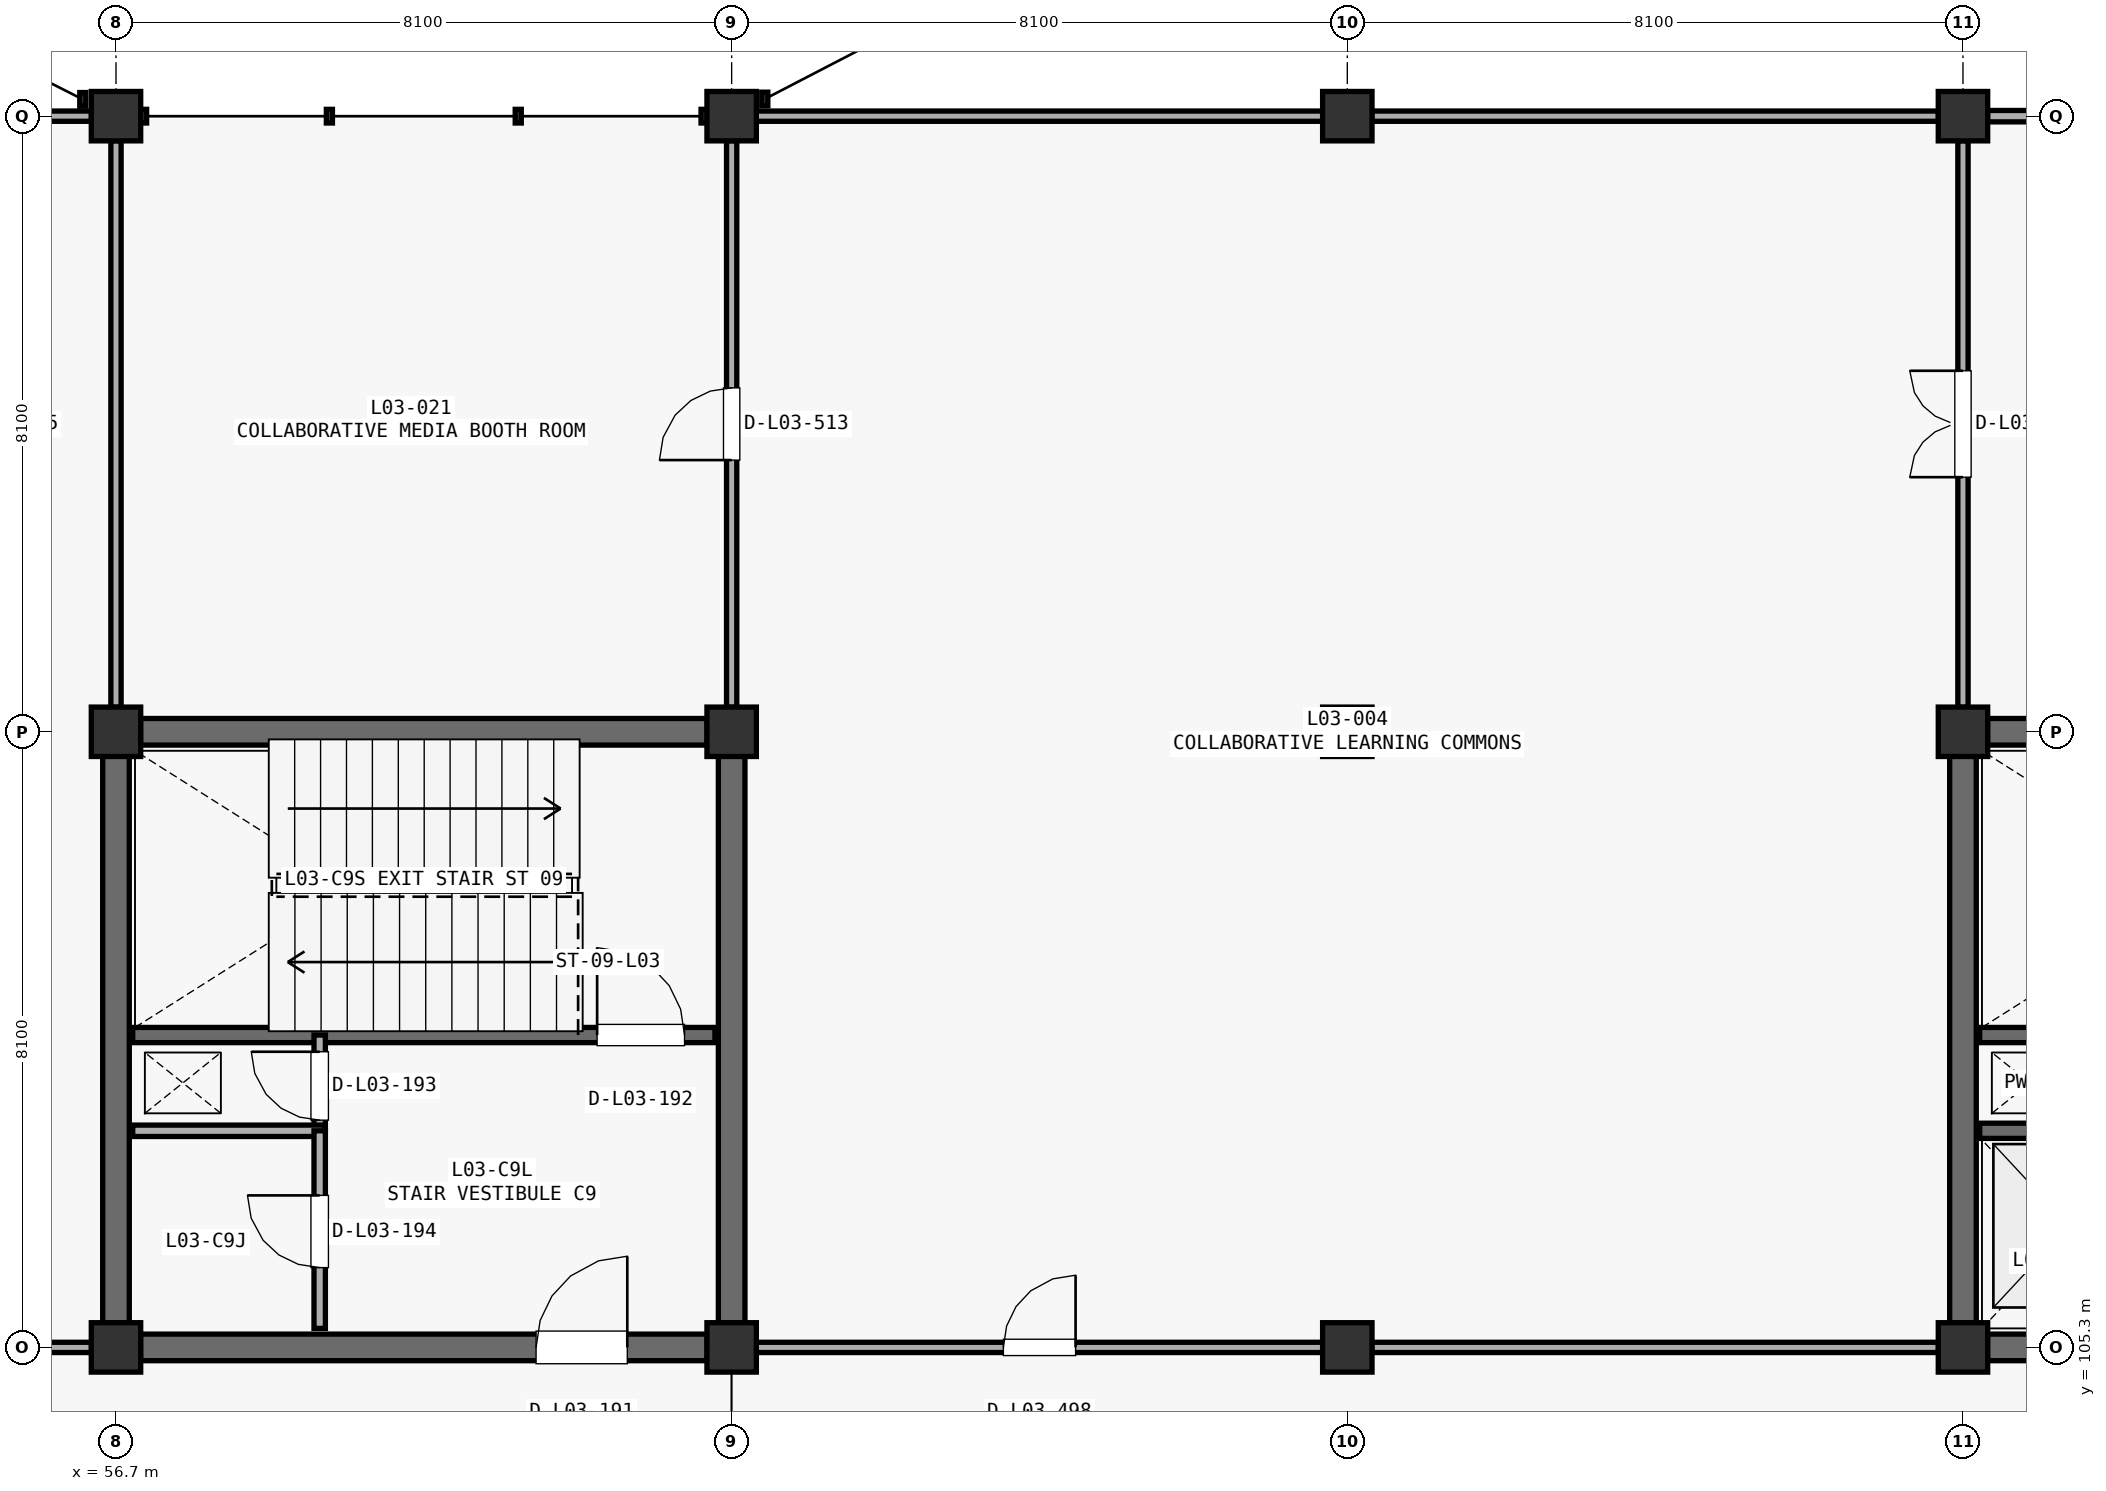
"""IFC4 building model, lengths in metres.
Left out: names, types, materials, properties, quantities, classifications, styles, units other than length and angle.
Written with IfcOpenShell. Run it as: python <this file> out.ifc"""

import sys

from ifc_helpers import new_model, si_unit, direction, frame, frame_2d, origin, origin_2d, place, context, subcontext, project, spatial, rectangle, extrude, element, fill, save


model = new_model("IFC4")
c1 = context("Model", 3, precision=1e-05, world=origin(), true_north=direction((0.0, 1.0)))
c2 = subcontext(c1, "Body", "Model", "MODEL_VIEW")
j1 = project(units=[si_unit("LENGTHUNIT", "METRE"), si_unit("PLANEANGLEUNIT", "RADIAN")], contexts=[c1])
p1 = place(None, origin())
s1 = spatial("IfcSite", under=j1, at=p1, CompositionType="ELEMENT")
p2 = place(p1, origin())
s2 = spatial("IfcBuilding", under=s1, at=p2, CompositionType="ELEMENT")
p3 = place(p2, frame((0.0, 0.0, 14.11)))
s3 = spatial("IfcBuildingStorey", under=s2, at=p3, CompositionType="ELEMENT", Elevation=14.11)
for number, where, z_axis, x_axis in (
    (1, (56.7, 105.3, 0.0), (0.0, 0.0, 1.0), (1.0, 0.0, 0.0)),
    (2, (56.7, 113.4, 0.0), (0.0, 0.0, 1.0), (1.0, 0.0, 0.0)),
    (3, (56.7, 121.5, 0.0), (0.0, 0.0, 1.0), (1.0, 0.0, 0.0)),
    (4, (64.8, 105.3, 0.0), (0.0, 0.0, 1.0), (1.0, 0.0, 0.0)),
    (5, (64.8, 113.4, 0.0), (0.0, 0.0, 1.0), (1.0, 0.0, 0.0)),
    (6, (64.8, 121.5, 0.0), (0.0, 0.0, 1.0), (1.0, 0.0, 0.0)),
    (7, (72.9, 105.3, 0.0), (0.0, 0.0, 1.0), (1.0, 0.0, 0.0)),
    (8, (72.9, 113.4, 0.0), (0.0, 0.0, 1.0), (1.0, 0.0, 0.0)),
    (9, (72.9, 121.5, 0.0), (0.0, 0.0, 1.0), (1.0, 0.0, 0.0)),
    (10, (81.0, 105.3, 0.0), (0.0, 0.0, 1.0), (1.0, 0.0, 0.0)),
    (11, (81.0, 113.4, 0.0), (0.0, 0.0, 1.0), (1.0, 0.0, 0.0)),
    (12, (81.0, 121.5, 0.0), (0.0, 0.0, 1.0), (1.0, 0.0, 0.0)),
):
    element("IfcColumn", number, at=place(p3, frame(where, z_axis=z_axis, x_axis=x_axis)), inside=s3, PredefinedType="COLUMN", context=c2, shape_type="SweptSolid", body=[
        extrude(rectangle(XDim=0.65, YDim=0.65, at=origin_2d()), origin(), (0.0, 0.0, 1.0), 4.42),
    ])
p4 = place(p3, frame((81.323, 113.4, 0.0), z_axis=(0.0, 0.0, 1.0), x_axis=(1.0, 0.0, 0.0)))
e13 = element("IfcWall", 13, at=p4, inside=s3, PredefinedType="SHEAR", context=c2, shape_type="SweptSolid", body=[
    extrude(rectangle(XDim=7.454, YDim=0.35, at=frame_2d((3.727, 0.0))), origin(), (0.0, 0.0, 1.0), 4.152),
])
p5 = place(p3, frame((81.0, 105.623, 0.0), z_axis=(0.0, 0.0, 1.0), x_axis=(0.0, 1.0, 0.0)))
e14 = element("IfcWall", 14, at=p5, inside=s3, PredefinedType="SHEAR", context=c2, shape_type="SweptSolid", body=[
    extrude(rectangle(XDim=7.454, YDim=0.35, at=frame_2d((3.727, 0.0))), origin(), (0.0, 0.0, 1.0), 4.152),
])
p6 = place(p3, frame((81.323, 105.3, 0.0), z_axis=(0.0, 0.0, 1.0), x_axis=(1.0, 0.0, 0.0)))
e15 = element("IfcWall", 15, at=p6, inside=s3, PredefinedType="SHEAR", context=c2, shape_type="SweptSolid", body=[
    extrude(rectangle(XDim=7.454, YDim=0.35, at=frame_2d((3.727, 0.0))), origin(), (0.0, 0.0, 1.0), 4.152),
])
p7 = place(p6, frame((5.204, 0.0, 0.0)))
e16 = element("IfcOpeningElement", 16, at=p7, cuts=e15, PredefinedType="OPENING", context=c2, shape_type="SweptSolid", body=[
    extrude(rectangle(XDim=1.2, YDim=2.2, at=frame_2d((0.6, 1.1))), frame((0.0, 0.185, 0.0), z_axis=(0.0, -1.0, 0.0), x_axis=(1.0, 0.0, 0.0)), (0.0, 0.0, 1.0), 0.37),
])
p8 = place(p3, frame((81.22, 109.41, 0.0), z_axis=(0.0, 0.0, 1.0), x_axis=(1.0, 0.0, 0.0)))
e17 = element("IfcWall", 17, at=p8, inside=s3, PredefinedType="SHEAR", context=c2, shape_type="SweptSolid", body=[
    extrude(rectangle(XDim=7.66, YDim=0.2, at=frame_2d((3.83, 0.0))), origin(), (0.0, 0.0, 1.0), 4.152),
])
p9 = place(p8, frame((6.11, 0.0, 0.0)))
e18 = element("IfcOpeningElement", 18, at=p9, cuts=e17, PredefinedType="OPENING", context=c2, shape_type="SweptSolid", body=[
    extrude(rectangle(XDim=1.15, YDim=2.2, at=frame_2d((0.575, 1.1))), frame((0.0, 0.11, 0.0), z_axis=(0.0, -1.0, 0.0), x_axis=(1.0, 0.0, 0.0)), (0.0, 0.0, 1.0), 0.22),
])
p10 = place(p3, frame((81.22, 108.15, 0.0), z_axis=(0.0, 0.0, 1.0), x_axis=(1.0, 0.0, 0.0)))
e19 = element("IfcWall", 19, at=p10, inside=s3, PredefinedType="SHEAR", context=c2, shape_type="SweptSolid", body=[
    extrude(rectangle(XDim=2.56, YDim=0.2, at=frame_2d((1.28, 0.0))), origin(), (0.0, 0.0, 1.0), 4.152),
])
p11 = place(p3, frame((57.023, 113.4, 0.0), z_axis=(0.0, 0.0, 1.0), x_axis=(1.0, 0.0, 0.0)))
e20 = element("IfcWall", 20, at=p11, inside=s3, PredefinedType="SHEAR", context=c2, shape_type="SweptSolid", body=[
    extrude(rectangle(XDim=7.454, YDim=0.35, at=frame_2d((3.727, 0.0))), origin(), (0.0, 0.0, 1.0), 4.162),
])
for number, where, z_axis, x_axis in (
    (21, (56.7, 105.623, 0.0), (0.0, 0.0, 1.0), (0.0, 1.0, 0.0)),
    (22, (64.8, 105.623, 0.0), (0.0, 0.0, 1.0), (0.0, 1.0, 0.0)),
):
    element("IfcWall", number, at=place(p3, frame(where, z_axis=z_axis, x_axis=x_axis)), inside=s3, PredefinedType="SHEAR", context=c2, shape_type="SweptSolid", body=[
        extrude(rectangle(XDim=7.454, YDim=0.35, at=frame_2d((3.727, 0.0))), origin(), (0.0, 0.0, 1.0), 4.162),
    ])
p12 = place(p3, frame((57.023, 105.3, 0.0), z_axis=(0.0, 0.0, 1.0), x_axis=(1.0, 0.0, 0.0)))
e23 = element("IfcWall", 23, at=p12, inside=s3, PredefinedType="SHEAR", context=c2, shape_type="SweptSolid", body=[
    extrude(rectangle(XDim=7.454, YDim=0.35, at=frame_2d((3.727, 0.0))), origin(), (0.0, 0.0, 1.0), 4.162),
])
p13 = place(p12, frame((5.204, 0.0, 0.0)))
e24 = element("IfcOpeningElement", 24, at=p13, cuts=e23, PredefinedType="OPENING", context=c2, shape_type="SweptSolid", body=[
    extrude(rectangle(XDim=1.2, YDim=2.2, at=frame_2d((0.6, 1.1))), frame((0.0, 0.185, 0.0), z_axis=(0.0, -1.0, 0.0), x_axis=(1.0, 0.0, 0.0)), (0.0, 0.0, 1.0), 0.37),
])
p14 = place(p3, frame((56.92, 109.41, 0.0), z_axis=(0.0, 0.0, 1.0), x_axis=(1.0, 0.0, 0.0)))
e25 = element("IfcWall", 25, at=p14, inside=s3, PredefinedType="SHEAR", context=c2, shape_type="SweptSolid", body=[
    extrude(rectangle(XDim=7.66, YDim=0.2, at=frame_2d((3.83, 0.0))), origin(), (0.0, 0.0, 1.0), 4.162),
])
p15 = place(p14, frame((6.11, 0.0, 0.0)))
e26 = element("IfcOpeningElement", 26, at=p15, cuts=e25, PredefinedType="OPENING", context=c2, shape_type="SweptSolid", body=[
    extrude(rectangle(XDim=1.15, YDim=2.2, at=frame_2d((0.575, 1.1))), frame((0.0, 0.11, 0.0), z_axis=(0.0, -1.0, 0.0), x_axis=(1.0, 0.0, 0.0)), (0.0, 0.0, 1.0), 0.22),
])
p16 = place(p3, frame((59.38, 108.15, 0.0), z_axis=(0.0, 0.0, 1.0), x_axis=(0.0, 1.0, 0.0)))
e27 = element("IfcWall", 27, at=p16, inside=s3, PredefinedType="PARTITIONING", context=c2, shape_type="SweptSolid", body=[
    extrude(rectangle(XDim=1.26, YDim=0.15, at=frame_2d((0.63, 0.0))), origin(), (0.0, 0.0, 1.0), 4.162),
])
p17 = place(p16, frame((0.14, 0.0, 0.0)))
e28 = element("IfcOpeningElement", 28, at=p17, cuts=e27, PredefinedType="OPENING", context=c2, shape_type="SweptSolid", body=[
    extrude(rectangle(XDim=0.9, YDim=2.15, at=frame_2d((0.45, 1.075))), frame((0.0, 0.085, 0.0), z_axis=(0.0, -1.0, 0.0), x_axis=(1.0, 0.0, 0.0)), (0.0, 0.0, 1.0), 0.17),
])
p18 = place(p3, frame((56.92, 108.15, 0.0), z_axis=(0.0, 0.0, 1.0), x_axis=(1.0, 0.0, 0.0)))
e29 = element("IfcWall", 29, at=p18, inside=s3, PredefinedType="PARTITIONING", context=c2, shape_type="SweptSolid", body=[
    extrude(rectangle(XDim=2.53, YDim=0.15, at=frame_2d((1.265, 0.0))), origin(), (0.0, 0.0, 1.0), 4.162),
])
p19 = place(p3, frame((59.38, 105.55, 0.0), z_axis=(0.0, 0.0, 1.0), x_axis=(0.0, 1.0, 0.0)))
e30 = element("IfcWall", 30, at=p19, inside=s3, PredefinedType="PARTITIONING", context=c2, shape_type="SweptSolid", body=[
    extrude(rectangle(XDim=2.6, YDim=0.15, at=frame_2d((1.3, 0.0))), origin(), (0.0, 0.0, 1.0), 4.162),
])
p20 = place(p19, frame((0.8, 0.0, 0.0)))
e31 = element("IfcOpeningElement", 31, at=p20, cuts=e30, PredefinedType="OPENING", context=c2, shape_type="SweptSolid", body=[
    extrude(rectangle(XDim=0.95, YDim=2.15, at=frame_2d((0.475, 1.075))), frame((0.0, 0.085, 0.0), z_axis=(0.0, -1.0, 0.0), x_axis=(1.0, 0.0, 0.0)), (0.0, 0.0, 1.0), 0.17),
])
p21 = place(p3, frame((48.923, 105.3, 0.0), z_axis=(0.0, 0.0, 1.0), x_axis=(1.0, 0.0, 0.0)))
e32 = element("IfcWall", 32, at=p21, inside=s3, PredefinedType="PARTITIONING", context=c2, shape_type="SweptSolid", body=[
    extrude(rectangle(XDim=7.454, YDim=0.135, at=frame_2d((3.727, 0.0))), origin(), (0.0, 0.0, 1.0), 3.312),
])
p22 = place(p21, frame((3.252, 0.0, 0.0)))
e33 = element("IfcOpeningElement", 33, at=p22, cuts=e32, PredefinedType="OPENING", context=c2, shape_type="SweptSolid", body=[
    extrude(rectangle(XDim=0.95, YDim=2.15, at=frame_2d((0.475, 1.075))), frame((0.0, 0.078, 0.0), z_axis=(0.0, -1.0, 0.0), x_axis=(1.0, 0.0, 0.0)), (0.0, 0.0, 1.0), 0.155),
])
p23 = place(p3, frame((56.7, 113.723, 0.0), z_axis=(0.0, 0.0, 1.0), x_axis=(0.0, 1.0, 0.0)))
e34 = element("IfcWall", 34, at=p23, inside=s3, PredefinedType="PARTITIONING", context=c2, shape_type="SweptSolid", body=[
    extrude(rectangle(XDim=7.454, YDim=0.135, at=frame_2d((3.727, 0.0))), origin(), (0.0, 0.0, 1.0), 3.562),
])
p24 = place(p3, frame((48.923, 121.5, 0.0), z_axis=(0.0, 0.0, 1.0), x_axis=(1.0, 0.0, 0.0)))
e35 = element("IfcWall", 35, at=p24, inside=s3, PredefinedType="PARTITIONING", context=c2, shape_type="SweptSolid", body=[
    extrude(rectangle(XDim=7.454, YDim=0.135, at=frame_2d((3.727, 0.0))), origin(), (0.0, 0.0, 1.0), 3.747),
])
p25 = place(p3, frame((65.123, 105.3, 0.0), z_axis=(0.0, 0.0, 1.0), x_axis=(1.0, 0.0, 0.0)))
e36 = element("IfcWall", 36, at=p25, inside=s3, PredefinedType="PARTITIONING", context=c2, shape_type="SweptSolid", body=[
    extrude(rectangle(XDim=7.454, YDim=0.135, at=frame_2d((3.727, 0.0))), origin(), (0.0, 0.0, 1.0), 3.412),
])
p26 = place(p25, frame((3.252, 0.0, 0.0)))
e37 = element("IfcOpeningElement", 37, at=p26, cuts=e36, PredefinedType="OPENING", context=c2, shape_type="SweptSolid", body=[
    extrude(rectangle(XDim=0.95, YDim=2.15, at=frame_2d((0.475, 1.075))), frame((0.0, 0.078, 0.0), z_axis=(0.0, -1.0, 0.0), x_axis=(1.0, 0.0, 0.0)), (0.0, 0.0, 1.0), 0.155),
])
p27 = place(p3, frame((73.223, 105.3, 0.0), z_axis=(0.0, 0.0, 1.0), x_axis=(1.0, 0.0, 0.0)))
e38 = element("IfcWall", 38, at=p27, inside=s3, PredefinedType="PARTITIONING", context=c2, shape_type="SweptSolid", body=[
    extrude(rectangle(XDim=7.454, YDim=0.135, at=frame_2d((3.727, 0.0))), origin(), (0.0, 0.0, 1.0), 3.502),
])
p28 = place(p3, frame((81.0, 113.723, 0.0), z_axis=(0.0, 0.0, 1.0), x_axis=(0.0, 1.0, 0.0)))
e39 = element("IfcWall", 39, at=p28, inside=s3, PredefinedType="PARTITIONING", context=c2, shape_type="SweptSolid", body=[
    extrude(rectangle(XDim=7.454, YDim=0.135, at=frame_2d((3.727, 0.0))), origin(), (0.0, 0.0, 1.0), 3.302),
])
p29 = place(p28, frame((3.027, 0.0, 0.0)))
e40 = element("IfcOpeningElement", 40, at=p29, cuts=e39, PredefinedType="OPENING", context=c2, shape_type="SweptSolid", body=[
    extrude(rectangle(XDim=1.4, YDim=2.2, at=frame_2d((0.7, 1.1))), frame((0.0, 0.078, 0.0), z_axis=(0.0, -1.0, 0.0), x_axis=(1.0, 0.0, 0.0)), (0.0, 0.0, 1.0), 0.155),
])
p30 = place(p3, frame((64.8, 113.723, 0.0), z_axis=(0.0, 0.0, 1.0), x_axis=(0.0, 1.0, 0.0)))
e41 = element("IfcWall", 41, at=p30, inside=s3, PredefinedType="PARTITIONING", context=c2, shape_type="SweptSolid", body=[
    extrude(rectangle(XDim=7.454, YDim=0.135, at=frame_2d((3.727, 0.0))), origin(), (0.0, 0.0, 1.0), 3.212),
])
p31 = place(p30, frame((3.252, 0.0, 0.0)))
e42 = element("IfcOpeningElement", 42, at=p31, cuts=e41, PredefinedType="OPENING", context=c2, shape_type="SweptSolid", body=[
    extrude(rectangle(XDim=0.95, YDim=2.15, at=frame_2d((0.475, 1.075))), frame((0.0, 0.078, 0.0), z_axis=(0.0, -1.0, 0.0), x_axis=(1.0, 0.0, 0.0)), (0.0, 0.0, 1.0), 0.155),
])
p32 = place(p3, frame((65.123, 121.5, 0.0), z_axis=(0.0, 0.0, 1.0), x_axis=(1.0, 0.0, 0.0)))
e43 = element("IfcWall", 43, at=p32, inside=s3, PredefinedType="PARTITIONING", context=c2, shape_type="SweptSolid", body=[
    extrude(rectangle(XDim=7.454, YDim=0.135, at=frame_2d((3.727, 0.0))), origin(), (0.0, 0.0, 1.0), 3.562),
])
p33 = place(p3, frame((73.223, 121.5, 0.0), z_axis=(0.0, 0.0, 1.0), x_axis=(1.0, 0.0, 0.0)))
e44 = element("IfcWall", 44, at=p33, inside=s3, PredefinedType="PARTITIONING", context=c2, shape_type="SweptSolid", body=[
    extrude(rectangle(XDim=7.454, YDim=0.135, at=frame_2d((3.727, 0.0))), origin(), (0.0, 0.0, 1.0), 3.737),
])
p34 = place(p3, frame((81.323, 121.5, 0.0), z_axis=(0.0, 0.0, 1.0), x_axis=(1.0, 0.0, 0.0)))
e45 = element("IfcWall", 45, at=p34, inside=s3, PredefinedType="PARTITIONING", context=c2, shape_type="SweptSolid", body=[
    extrude(rectangle(XDim=7.454, YDim=0.15, at=frame_2d((3.727, 0.0))), origin(), (0.0, 0.0, 1.0), 3.202),
])
p35 = place(p13, origin())
e46 = element("IfcDoor", 46, at=p35, inside=s3, OperationType="SINGLE_SWING_RIGHT", PredefinedType="DOOR", context=c2, shape_type="SweptSolid", body=[
    extrude(rectangle(XDim=1.2, YDim=2.2, at=frame_2d((0.6, 1.1))), frame((0.0, 0.025, 0.0), z_axis=(0.0, -1.0, 0.0), x_axis=(1.0, 0.0, 0.0)), (0.0, 0.0, 1.0), 0.05),
])
fill(e24, e46)
p36 = place(p15, origin())
e47 = element("IfcDoor", 47, at=p36, inside=s3, OperationType="SINGLE_SWING_LEFT", PredefinedType="DOOR", context=c2, shape_type="SweptSolid", body=[
    extrude(rectangle(XDim=1.15, YDim=2.2, at=frame_2d((0.575, 1.1))), frame((0.0, 0.025, 0.0), z_axis=(0.0, -1.0, 0.0), x_axis=(1.0, 0.0, 0.0)), (0.0, 0.0, 1.0), 0.05),
])
fill(e26, e47)
p37 = place(p17, origin())
e48 = element("IfcDoor", 48, at=p37, inside=s3, OperationType="SINGLE_SWING_RIGHT", PredefinedType="DOOR", context=c2, shape_type="SweptSolid", body=[
    extrude(rectangle(XDim=0.9, YDim=2.15, at=frame_2d((0.45, 1.075))), frame((0.0, 0.025, 0.0), z_axis=(0.0, -1.0, 0.0), x_axis=(1.0, 0.0, 0.0)), (0.0, 0.0, 1.0), 0.05),
])
fill(e28, e48)
p38 = place(p20, origin())
e49 = element("IfcDoor", 49, at=p38, inside=s3, OperationType="SINGLE_SWING_RIGHT", PredefinedType="DOOR", context=c2, shape_type="SweptSolid", body=[
    extrude(rectangle(XDim=0.95, YDim=2.15, at=frame_2d((0.475, 1.075))), frame((0.0, 0.025, 0.0), z_axis=(0.0, -1.0, 0.0), x_axis=(1.0, 0.0, 0.0)), (0.0, 0.0, 1.0), 0.05),
])
fill(e31, e49)
p39 = place(p26, origin())
e50 = element("IfcDoor", 50, at=p39, inside=s3, OperationType="SINGLE_SWING_RIGHT", PredefinedType="DOOR", context=c2, shape_type="SweptSolid", body=[
    extrude(rectangle(XDim=0.95, YDim=2.15, at=frame_2d((0.475, 1.075))), frame((0.0, 0.025, 0.0), z_axis=(0.0, -1.0, 0.0), x_axis=(1.0, 0.0, 0.0)), (0.0, 0.0, 1.0), 0.05),
])
fill(e37, e50)
p40 = place(p31, origin())
e51 = element("IfcDoor", 51, at=p40, inside=s3, OperationType="SINGLE_SWING_LEFT", PredefinedType="DOOR", context=c2, shape_type="SweptSolid", body=[
    extrude(rectangle(XDim=0.95, YDim=2.15, at=frame_2d((0.475, 1.075))), frame((0.0, 0.025, 0.0), z_axis=(0.0, -1.0, 0.0), x_axis=(1.0, 0.0, 0.0)), (0.0, 0.0, 1.0), 0.05),
])
fill(e42, e51)
p41 = place(p29, origin())
e52 = element("IfcDoor", 52, at=p41, inside=s3, OperationType="DOUBLE_SWING_LEFT", PredefinedType="DOOR", context=c2, shape_type="SweptSolid", body=[
    extrude(rectangle(XDim=1.4, YDim=2.2, at=frame_2d((0.7, 1.1))), frame((0.0, 0.025, 0.0), z_axis=(0.0, -1.0, 0.0), x_axis=(1.0, 0.0, 0.0)), (0.0, 0.0, 1.0), 0.05),
])
fill(e40, e52)
save(model, sys.argv[1])
